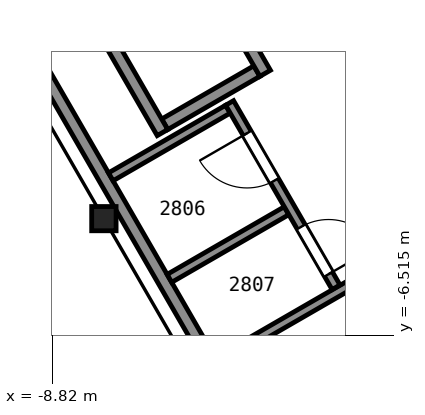
"""IFC4 building model, lengths in metres.
Left out: names, types, materials, properties, quantities, classifications, styles, units other than length and angle.
Written with IfcOpenShell. Run it as: python <this file> out.ifc"""

import sys

from ifc_helpers import new_model, si_unit, direction, frame, frame_2d, origin, origin_2d, place, context, subcontext, project, spatial, rectangle, i_section, extrude, element, fill, save


model = new_model("IFC4")
c1 = context("Model", 3, precision=1e-05, world=origin(), true_north=direction((0.0, 1.0)))
c2 = subcontext(c1, "Body", "Model", "MODEL_VIEW")
j1 = project(units=[si_unit("LENGTHUNIT", "METRE"), si_unit("PLANEANGLEUNIT", "RADIAN")], contexts=[c1])
p1 = place(None, origin())
s1 = spatial("IfcSite", under=j1, at=p1, CompositionType="ELEMENT")
p2 = place(p1, origin())
s2 = spatial("IfcBuilding", under=s1, at=p2, CompositionType="ELEMENT")
p3 = place(p2, frame((0.0, 0.0, 118.0)))
s3 = spatial("IfcBuildingStorey", under=s2, at=p3, CompositionType="ELEMENT", Elevation=118.0)
p4 = place(p3, frame((-7.97, -4.6, 0.0), z_axis=(0.0, 0.0, 1.0), x_axis=(1.0, 0.0, 0.0)))
e1 = element("IfcColumn", 1, at=p4, inside=s3, PredefinedType="COLUMN", context=c2, shape_type="SweptSolid", body=[
    extrude(i_section(OverallWidth=0.401, OverallDepth=0.399, WebThickness=0.025, FlangeThickness=0.04, FilletRadius=0.015, at=origin_2d()), origin(), (0.0, 0.0, 1.0), 3.6),
])
p5 = place(p3, frame((-6.97, -3.048, 0.0), z_axis=(0.0, 0.0, 1.0), x_axis=(0.866036909293, 0.499980071345, 0.0)))
e2 = element("IfcWall", 2, at=p5, inside=s3, PredefinedType="PARTITIONING", context=c2, shape_type="SweptSolid", body=[
    extrude(rectangle(XDim=1.75, YDim=0.2, at=frame_2d((0.875, 0.0))), origin(), (0.0, 0.0, 1.0), 3.6),
])
p6 = place(p3, frame((-5.318, -2.21, 0.0), z_axis=(0.0, 0.0, 1.0), x_axis=(-0.499938297808, 0.866061024631, 0.0)))
e3 = element("IfcWall", 3, at=p6, inside=s3, PredefinedType="PARTITIONING", context=c2, shape_type="SweptSolid", body=[
    extrude(rectangle(XDim=2.35, YDim=0.2, at=frame_2d((1.175, 0.0))), origin(), (0.0, 0.0, 1.0), 3.6),
])
p7 = place(p3, frame((-7.006, -3.185, 0.0), z_axis=(0.0, 0.0, 1.0), x_axis=(-0.499990435942, 0.866030925526, 0.0)))
e4 = element("IfcWall", 4, at=p7, inside=s3, PredefinedType="PARTITIONING", context=c2, shape_type="SweptSolid", body=[
    extrude(rectangle(XDim=2.55, YDim=0.2, at=frame_2d((1.275, 0.0))), origin(), (0.0, 0.0, 1.0), 3.6),
])
p8 = place(p3, frame((-13.664, 5.946, 0.0), z_axis=(0.0, 0.0, 1.0), x_axis=(0.499994327219, -0.866028678941, 0.0)))
e5 = element("IfcWall", 5, at=p8, inside=s3, PredefinedType="PARTITIONING", context=c2, shape_type="SweptSolid", body=[
    extrude(rectangle(XDim=23.968, YDim=0.2, at=frame_2d((11.984, 0.0))), origin(), (0.0, 0.0, 1.0), 3.35),
])
p9 = place(p3, frame((-7.856, -3.912, 0.0), z_axis=(0.0, 0.0, 1.0), x_axis=(0.865971748, 0.500092923031, 0.0)))
e6 = element("IfcWall", 6, at=p9, inside=s3, PredefinedType="PARTITIONING", context=c2, shape_type="SweptSolid", body=[
    extrude(rectangle(XDim=2.225, YDim=0.15, at=frame_2d((1.112, 0.0))), origin(), (0.0, 0.0, 1.0), 3.35),
])
p10 = place(p3, frame((-6.892, -5.582, 0.0), z_axis=(0.0, 0.0, 1.0), x_axis=(0.865944298464, 0.500140452231, 0.0)))
e7 = element("IfcWall", 7, at=p10, inside=s3, PredefinedType="PARTITIONING", context=c2, shape_type="SweptSolid", body=[
    extrude(rectangle(XDim=2.224, YDim=0.15, at=frame_2d((1.112, 0.0))), origin(), (0.0, 0.0, 1.0), 3.35),
])
p11 = place(p3, frame((-6.1, -6.946, 0.0), z_axis=(0.0, 0.0, 1.0), x_axis=(0.866038200431, 0.499977834903, 0.0)))
e8 = element("IfcWall", 8, at=p11, inside=s3, PredefinedType="PARTITIONING", context=c2, shape_type="SweptSolid", body=[
    extrude(rectangle(XDim=4.22, YDim=0.15, at=frame_2d((2.11, 0.0))), origin(), (0.0, 0.0, 1.0), 3.35),
])
p12 = place(p3, frame((-4.152, -5.729, 0.0), z_axis=(0.0, 0.0, 1.0), x_axis=(-0.500024287448, 0.866011380966, 0.0)))
e9 = element("IfcWall", 9, at=p12, inside=s3, PredefinedType="PARTITIONING", context=c2, shape_type="SweptSolid", body=[
    extrude(rectangle(XDim=3.501, YDim=0.15, at=frame_2d((1.75, 0.0))), origin(), (0.0, 0.0, 1.0), 3.35),
])
p13 = place(p12, frame((2.026, 0.0, 0.0)))
e10 = element("IfcOpeningElement", 10, at=p13, cuts=e9, PredefinedType="OPENING", context=c2, shape_type="SweptSolid", body=[
    extrude(rectangle(XDim=0.9, YDim=2.1, at=frame_2d((0.45, 1.05))), frame((0.0, 0.085, 0.0), z_axis=(0.0, -1.0, 0.0), x_axis=(1.0, 0.0, 0.0)), (0.0, 0.0, 1.0), 0.17),
])
p14 = place(p12, frame((0.248, 0.0, 0.0)))
e11 = element("IfcOpeningElement", 11, at=p14, cuts=e9, PredefinedType="OPENING", context=c2, shape_type="SweptSolid", body=[
    extrude(rectangle(XDim=0.9, YDim=2.1, at=frame_2d((0.45, 1.05))), frame((0.0, 0.085, 0.0), z_axis=(0.0, -1.0, 0.0), x_axis=(1.0, 0.0, 0.0)), (0.0, 0.0, 1.0), 0.17),
])
p15 = place(p3, frame((-3.756, -15.494, 0.0), z_axis=(0.0, 0.0, 1.0), x_axis=(-0.500027787016, 0.866009360349, 0.0)))
e12 = element("IfcWall", 12, at=p15, inside=s3, PredefinedType="PARTITIONING", context=c2, shape_type="SweptSolid", body=[
    extrude(rectangle(XDim=23.856, YDim=0.125, at=frame_2d((11.928, 0.0))), origin(), (0.0, 0.0, 1.0), 2.613),
])
p16 = place(p15, frame((22.393, 0.0, 0.0)))
e13 = element("IfcOpeningElement", 13, at=p16, cuts=e12, PredefinedType="OPENING", context=c2, shape_type="SweptSolid", body=[
    extrude(rectangle(XDim=1.0, YDim=2.1, at=frame_2d((0.5, 1.05))), frame((0.0, 0.073, 0.0), z_axis=(0.0, -1.0, 0.0), x_axis=(1.0, 0.0, 0.0)), (0.0, 0.0, 1.0), 0.145),
])
p17 = place(p15, frame((12.996, 0.0, 0.0)))
e14 = element("IfcOpeningElement", 14, at=p17, cuts=e12, PredefinedType="OPENING", context=c2, shape_type="SweptSolid", body=[
    extrude(rectangle(XDim=0.9, YDim=2.1, at=frame_2d((0.45, 1.05))), frame((0.0, 0.073, 0.0), z_axis=(0.0, -1.0, 0.0), x_axis=(1.0, 0.0, 0.0)), (0.0, 0.0, 1.0), 0.145),
])
p18 = place(p15, frame((9.011, 0.0, 0.0)))
e15 = element("IfcOpeningElement", 15, at=p18, cuts=e12, PredefinedType="OPENING", context=c2, shape_type="SweptSolid", body=[
    extrude(rectangle(XDim=1.0, YDim=2.1, at=frame_2d((0.5, 1.05))), frame((0.0, 0.073, 0.0), z_axis=(0.0, -1.0, 0.0), x_axis=(1.0, 0.0, 0.0)), (0.0, 0.0, 1.0), 0.145),
])
p19 = place(p13, origin())
e16 = element("IfcDoor", 16, at=p19, inside=s3, OperationType="SINGLE_SWING_RIGHT", PredefinedType="DOOR", context=c2, shape_type="SweptSolid", body=[
    extrude(rectangle(XDim=0.9, YDim=2.1, at=frame_2d((0.45, 1.05))), frame((0.0, 0.025, 0.0), z_axis=(0.0, -1.0, 0.0), x_axis=(1.0, 0.0, 0.0)), (0.0, 0.0, 1.0), 0.05),
])
fill(e10, e16)
p20 = place(p14, origin())
e17 = element("IfcDoor", 17, at=p20, inside=s3, OperationType="SINGLE_SWING_LEFT", PredefinedType="DOOR", context=c2, shape_type="SweptSolid", body=[
    extrude(rectangle(XDim=0.9, YDim=2.1, at=frame_2d((0.45, 1.05))), frame((0.0, 0.025, 0.0), z_axis=(0.0, -1.0, 0.0), x_axis=(1.0, 0.0, 0.0)), (0.0, 0.0, 1.0), 0.05),
])
fill(e11, e17)
save(model, sys.argv[1])
